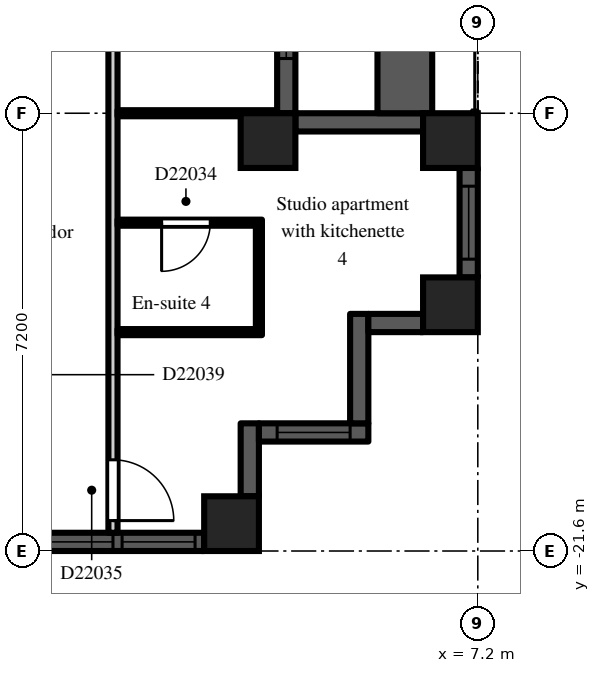
"""IFC4 building model, lengths in metres.
Left out: names, types, materials, properties, quantities, classifications, styles, units other than length and angle.
Written with IfcOpenShell. Run it as: python <this file> out.ifc"""

import sys

from ifc_helpers import new_model, si_unit, direction, frame, frame_2d, origin, origin_2d, place, context, subcontext, project, spatial, rectangle, extrude, element, fill, save


model = new_model("IFC4")
c1 = context("Model", 3, precision=1e-05, world=origin(), true_north=direction((0.0, 1.0)))
c2 = subcontext(c1, "Body", "Model", "MODEL_VIEW")
j1 = project(units=[si_unit("LENGTHUNIT", "METRE"), si_unit("PLANEANGLEUNIT", "RADIAN")], contexts=[c1])
p1 = place(None, origin())
s1 = spatial("IfcSite", under=j1, at=p1, CompositionType="ELEMENT")
p2 = place(p1, origin())
s2 = spatial("IfcBuilding", under=s1, at=p2, CompositionType="ELEMENT")
p3 = place(p2, frame((0.0, 0.0, 156.3)))
s3 = spatial("IfcBuildingStorey", under=s2, at=p3, CompositionType="ELEMENT", Elevation=156.3)
for number, where, z_axis, x_axis in (
    (1, (3.15, -21.15, 0.0), (0.0, 0.0, 1.0), (1.0, 0.0, 0.0)),
    (2, (3.75, -14.85, 0.0), (0.0, 0.0, 1.0), (1.0, 0.0, 0.0)),
    (3, (6.75, -17.55, 0.0), (0.0, 0.0, 1.0), (1.0, 0.0, 0.0)),
    (4, (6.75, -14.85, 0.0), (0.0, 0.0, 1.0), (1.0, 0.0, 0.0)),
):
    element("IfcColumn", number, at=place(p3, frame(where, z_axis=z_axis, x_axis=x_axis)), inside=s3, PredefinedType="COLUMN", context=c2, shape_type="SweptSolid", body=[
        extrude(rectangle(XDim=0.9, YDim=0.9, at=origin_2d()), origin(), (0.0, 0.0, 1.0), 3.0),
    ])
p4 = place(p3, frame((-2.7, -21.45, 0.0), z_axis=(0.0, 0.0, 1.0), x_axis=(1.0, 0.0, 0.0)))
e5 = element("IfcWall", 5, at=p4, inside=s3, PredefinedType="SOLIDWALL", context=c2, shape_type="SweptSolid", body=[
    extrude(rectangle(XDim=5.4, YDim=0.3, at=frame_2d((2.7, 0.0))), origin(), (0.0, 0.0, 1.0), 2.2),
])
p5 = place(p4, frame((1.5, 0.0, 0.2)))
e6 = element("IfcOpeningElement", 6, at=p5, cuts=e5, PredefinedType="OPENING", context=c2, shape_type="SweptSolid", body=[
    extrude(rectangle(XDim=2.4, YDim=1.85, at=frame_2d((1.2, 0.925))), frame((0.0, 0.16, 0.0), z_axis=(0.0, -1.0, 0.0), x_axis=(1.0, 0.0, 0.0)), (0.0, 0.0, 1.0), 0.32),
])
p6 = place(p4, frame((0.15, 0.0, 0.2)))
e7 = element("IfcOpeningElement", 7, at=p6, cuts=e5, PredefinedType="OPENING", context=c2, shape_type="SweptSolid", body=[
    extrude(rectangle(XDim=1.2, YDim=1.85, at=frame_2d((0.6, 0.925))), frame((0.0, 0.16, 0.0), z_axis=(0.0, -1.0, 0.0), x_axis=(1.0, 0.0, 0.0)), (0.0, 0.0, 1.0), 0.32),
])
p7 = place(p4, frame((4.05, 0.0, 0.2)))
e8 = element("IfcOpeningElement", 8, at=p7, cuts=e5, PredefinedType="OPENING", context=c2, shape_type="SweptSolid", body=[
    extrude(rectangle(XDim=1.2, YDim=1.85, at=frame_2d((0.6, 0.925))), frame((0.0, 0.16, 0.0), z_axis=(0.0, -1.0, 0.0), x_axis=(1.0, 0.0, 0.0)), (0.0, 0.0, 1.0), 0.32),
])
p8 = place(p3, frame((3.45, -20.7, 0.0), z_axis=(0.0, 0.0, 1.0), x_axis=(0.0, 1.0, 0.0)))
e9 = element("IfcWall", 9, at=p8, inside=s3, PredefinedType="SOLIDWALL", context=c2, shape_type="SweptSolid", body=[
    extrude(rectangle(XDim=1.2, YDim=0.3, at=frame_2d((0.6, 0.0))), origin(), (0.0, 0.0, 1.0), 2.6),
])
p9 = place(p3, frame((3.6, -19.65, 0.0), z_axis=(0.0, 0.0, 1.0), x_axis=(1.0, 0.0, 0.0)))
e10 = element("IfcWall", 10, at=p9, inside=s3, PredefinedType="SOLIDWALL", context=c2, shape_type="SweptSolid", body=[
    extrude(rectangle(XDim=1.8, YDim=0.3, at=frame_2d((0.9, 0.0))), origin(), (0.0, 0.0, 1.0), 2.6),
])
p10 = place(p9, frame((0.3, 0.0, 0.2)))
e11 = element("IfcOpeningElement", 11, at=p10, cuts=e10, PredefinedType="OPENING", context=c2, shape_type="SweptSolid", body=[
    extrude(rectangle(XDim=1.2, YDim=1.85, at=frame_2d((0.6, 0.925))), frame((0.0, 0.16, 0.0), z_axis=(0.0, -1.0, 0.0), x_axis=(1.0, 0.0, 0.0)), (0.0, 0.0, 1.0), 0.32),
])
p11 = place(p3, frame((5.25, -19.5, 0.0), z_axis=(0.0, 0.0, 1.0), x_axis=(0.0, 1.0, 0.0)))
e12 = element("IfcWall", 12, at=p11, inside=s3, PredefinedType="SOLIDWALL", context=c2, shape_type="SweptSolid", body=[
    extrude(rectangle(XDim=1.8, YDim=0.3, at=frame_2d((0.9, 0.0))), origin(), (0.0, 0.0, 1.0), 2.6),
])
p12 = place(p3, frame((5.4, -17.85, 0.0), z_axis=(0.0, 0.0, 1.0), x_axis=(1.0, 0.0, 0.0)))
e13 = element("IfcWall", 13, at=p12, inside=s3, PredefinedType="SOLIDWALL", context=c2, shape_type="SweptSolid", body=[
    extrude(rectangle(XDim=0.9, YDim=0.3, at=frame_2d((0.45, 0.0))), origin(), (0.0, 0.0, 1.0), 2.6),
])
p13 = place(p3, frame((7.05, -17.1, 0.0), z_axis=(0.0, 0.0, 1.0), x_axis=(0.0, 1.0, 0.0)))
e14 = element("IfcWall", 14, at=p13, inside=s3, PredefinedType="SOLIDWALL", context=c2, shape_type="SweptSolid", body=[
    extrude(rectangle(XDim=1.8, YDim=0.3, at=frame_2d((0.9, 0.0))), origin(), (0.0, 0.0, 1.0), 2.2),
])
p14 = place(p13, frame((0.3, 0.0, 0.2)))
e15 = element("IfcOpeningElement", 15, at=p14, cuts=e14, PredefinedType="OPENING", context=c2, shape_type="SweptSolid", body=[
    extrude(rectangle(XDim=1.2, YDim=1.85, at=frame_2d((0.6, 0.925))), frame((0.0, 0.16, 0.0), z_axis=(0.0, -1.0, 0.0), x_axis=(1.0, 0.0, 0.0)), (0.0, 0.0, 1.0), 0.32),
])
p15 = place(p3, frame((6.3, -14.55, 0.0), z_axis=(0.0, 0.0, 1.0), x_axis=(-1.0, 0.0, 0.0)))
e16 = element("IfcWall", 16, at=p15, inside=s3, PredefinedType="SOLIDWALL", context=c2, shape_type="SweptSolid", body=[
    extrude(rectangle(XDim=2.1, YDim=0.3, at=frame_2d((1.05, 0.0))), origin(), (0.0, 0.0, 1.0), 2.2),
])
p16 = place(p3, frame((4.05, -14.4, 0.0), z_axis=(0.0, 0.0, 1.0), x_axis=(0.0, 1.0, 0.0)))
e17 = element("IfcWall", 17, at=p16, inside=s3, PredefinedType="SOLIDWALL", context=c2, shape_type="SweptSolid", body=[
    extrude(rectangle(XDim=7.2, YDim=0.3, at=frame_2d((3.6, 0.0))), origin(), (0.0, 0.0, 1.0), 2.2),
])
p17 = place(p16, frame((3.0, 0.0, 0.0)))
e18 = element("IfcOpeningElement", 18, at=p17, cuts=e17, PredefinedType="OPENING", context=c2, shape_type="SweptSolid", body=[
    extrude(rectangle(XDim=1.2, YDim=2.05, at=frame_2d((0.6, 1.025))), frame((0.0, 0.16, 0.0), z_axis=(0.0, -1.0, 0.0), x_axis=(1.0, 0.0, 0.0)), (0.0, 0.0, 1.0), 0.32),
])
p18 = place(p16, frame((0.9, 0.0, 0.2)))
e19 = element("IfcOpeningElement", 19, at=p18, cuts=e17, PredefinedType="OPENING", context=c2, shape_type="SweptSolid", body=[
    extrude(rectangle(XDim=1.8, YDim=1.85, at=frame_2d((0.9, 0.925))), frame((0.0, 0.16, 0.0), z_axis=(0.0, -1.0, 0.0), x_axis=(1.0, 0.0, 0.0)), (0.0, 0.0, 1.0), 0.32),
])
p19 = place(p16, frame((4.5, 0.0, 0.2)))
e20 = element("IfcOpeningElement", 20, at=p19, cuts=e17, PredefinedType="OPENING", context=c2, shape_type="SweptSolid", body=[
    extrude(rectangle(XDim=1.8, YDim=1.85, at=frame_2d((0.9, 0.925))), frame((0.0, 0.16, 0.0), z_axis=(0.0, -1.0, 0.0), x_axis=(1.0, 0.0, 0.0)), (0.0, 0.0, 1.0), 0.32),
])
p20 = place(p3, frame((6.0, -14.4, 0.0), z_axis=(0.0, 0.0, 1.0), x_axis=(0.0, 1.0, 0.0)))
e21 = element("IfcWall", 21, at=p20, inside=s3, PredefinedType="PARAPET", context=c2, shape_type="SweptSolid", body=[
    extrude(rectangle(XDim=7.2, YDim=0.9, at=frame_2d((3.6, 0.0))), origin(), (0.0, 0.0, 1.0), 0.8),
])
p21 = place(p3, frame((1.2, -21.3, 0.0), z_axis=(0.0, 0.0, 1.0), x_axis=(0.0, 1.0, 0.0)))
e22 = element("IfcWall", 22, at=p21, inside=s3, PredefinedType="PARTITIONING", context=c2, shape_type="SweptSolid", body=[
    extrude(rectangle(XDim=14.175, YDim=0.15, at=frame_2d((7.087, 0.0))), origin(), (0.0, 0.0, 1.0), 2.6),
])
p22 = place(p21, frame((8.25, 0.0, 0.0)))
e23 = element("IfcOpeningElement", 23, at=p22, cuts=e22, PredefinedType="OPENING", context=c2, shape_type="SweptSolid", body=[
    extrude(rectangle(XDim=0.9, YDim=2.1, at=frame_2d((0.45, 1.05))), frame((0.0, 0.085, 0.0), z_axis=(0.0, -1.0, 0.0), x_axis=(1.0, 0.0, 0.0)), (0.0, 0.0, 1.0), 0.17),
])
p23 = place(p21, frame((0.2, 0.0, 0.0)))
e24 = element("IfcOpeningElement", 24, at=p23, cuts=e22, PredefinedType="OPENING", context=c2, shape_type="SweptSolid", body=[
    extrude(rectangle(XDim=1.0, YDim=2.1, at=frame_2d((0.5, 1.05))), frame((0.0, 0.085, 0.0), z_axis=(0.0, -1.0, 0.0), x_axis=(1.0, 0.0, 0.0)), (0.0, 0.0, 1.0), 0.17),
])
p24 = place(p3, frame((1.275, -18.0, 0.0), z_axis=(0.0, 0.0, 1.0), x_axis=(1.0, 0.0, 0.0)))
e25 = element("IfcWall", 25, at=p24, inside=s3, PredefinedType="PARTITIONING", context=c2, shape_type="SweptSolid", body=[
    extrude(rectangle(XDim=2.375, YDim=0.1, at=frame_2d((1.188, 0.0))), origin(), (0.0, 0.0, 1.0), 2.6),
])
p25 = place(p3, frame((1.275, -16.2, 0.0), z_axis=(0.0, 0.0, 1.0), x_axis=(1.0, 0.0, 0.0)))
e26 = element("IfcWall", 26, at=p25, inside=s3, PredefinedType="PARTITIONING", context=c2, shape_type="SweptSolid", body=[
    extrude(rectangle(XDim=2.375, YDim=0.1, at=frame_2d((1.188, 0.0))), origin(), (0.0, 0.0, 1.0), 2.6),
])
p26 = place(p25, frame((0.725, 0.0, 0.0)))
e27 = element("IfcOpeningElement", 27, at=p26, cuts=e26, PredefinedType="OPENING", context=c2, shape_type="SweptSolid", body=[
    extrude(rectangle(XDim=0.8, YDim=2.1, at=frame_2d((0.4, 1.05))), frame((0.0, 0.06, 0.0), z_axis=(0.0, -1.0, 0.0), x_axis=(1.0, 0.0, 0.0)), (0.0, 0.0, 1.0), 0.12),
])
p27 = place(p3, frame((1.275, -14.4, 0.0), z_axis=(0.0, 0.0, 1.0), x_axis=(1.0, 0.0, 0.0)))
e28 = element("IfcWall", 28, at=p27, inside=s3, PredefinedType="PARTITIONING", context=c2, shape_type="SweptSolid", body=[
    extrude(rectangle(XDim=2.625, YDim=0.1, at=frame_2d((1.312, 0.0))), origin(), (0.0, 0.0, 1.0), 2.6),
])
p28 = place(p3, frame((3.6, -17.95, 0.0), z_axis=(0.0, 0.0, 1.0), x_axis=(0.0, 1.0, 0.0)))
e29 = element("IfcWall", 29, at=p28, inside=s3, PredefinedType="PARTITIONING", context=c2, shape_type="SweptSolid", body=[
    extrude(rectangle(XDim=1.7, YDim=0.1, at=frame_2d((0.85, 0.0))), origin(), (0.0, 0.0, 1.0), 2.6),
])
p29 = place(p5, origin())
e30 = element("IfcWindow", 30, at=p29, inside=s3, PartitioningType="SINGLE_PANEL", PredefinedType="WINDOW", context=c2, shape_type="SweptSolid", body=[
    extrude(rectangle(XDim=2.4, YDim=1.85, at=frame_2d((1.2, 0.925))), frame((0.0, 0.03, 0.0), z_axis=(0.0, -1.0, 0.0), x_axis=(1.0, 0.0, 0.0)), (0.0, 0.0, 1.0), 0.06),
])
fill(e6, e30)
p30 = place(p7, origin())
e31 = element("IfcWindow", 31, at=p30, inside=s3, PartitioningType="SINGLE_PANEL", PredefinedType="WINDOW", context=c2, shape_type="SweptSolid", body=[
    extrude(rectangle(XDim=1.2, YDim=1.85, at=frame_2d((0.6, 0.925))), frame((0.0, 0.03, 0.0), z_axis=(0.0, -1.0, 0.0), x_axis=(1.0, 0.0, 0.0)), (0.0, 0.0, 1.0), 0.06),
])
fill(e8, e31)
p31 = place(p10, origin())
e32 = element("IfcWindow", 32, at=p31, inside=s3, PartitioningType="SINGLE_PANEL", PredefinedType="WINDOW", context=c2, shape_type="SweptSolid", body=[
    extrude(rectangle(XDim=1.2, YDim=1.85, at=frame_2d((0.6, 0.925))), frame((0.0, 0.03, 0.0), z_axis=(0.0, -1.0, 0.0), x_axis=(1.0, 0.0, 0.0)), (0.0, 0.0, 1.0), 0.06),
])
fill(e11, e32)
p32 = place(p14, origin())
e33 = element("IfcWindow", 33, at=p32, inside=s3, PartitioningType="SINGLE_PANEL", PredefinedType="WINDOW", context=c2, shape_type="SweptSolid", body=[
    extrude(rectangle(XDim=1.2, YDim=1.85, at=frame_2d((0.6, 0.925))), frame((0.0, 0.03, 0.0), z_axis=(0.0, -1.0, 0.0), x_axis=(1.0, 0.0, 0.0)), (0.0, 0.0, 1.0), 0.06),
])
fill(e15, e33)
p33 = place(p18, origin())
e34 = element("IfcWindow", 34, at=p33, inside=s3, PartitioningType="SINGLE_PANEL", PredefinedType="WINDOW", context=c2, shape_type="SweptSolid", body=[
    extrude(rectangle(XDim=1.8, YDim=1.85, at=frame_2d((0.9, 0.925))), frame((0.0, 0.03, 0.0), z_axis=(0.0, -1.0, 0.0), x_axis=(1.0, 0.0, 0.0)), (0.0, 0.0, 1.0), 0.06),
])
fill(e19, e34)
p34 = place(p26, frame((0.8, 0.0, 0.0), z_axis=(0.0, 0.0, 1.0), x_axis=(-1.0, 0.0, 0.0)))
e35 = element("IfcDoor", 35, at=p34, inside=s3, OperationType="SINGLE_SWING_RIGHT", PredefinedType="DOOR", context=c2, shape_type="SweptSolid", body=[
    extrude(rectangle(XDim=0.8, YDim=2.1, at=frame_2d((0.4, 1.05))), frame((0.0, 0.025, 0.0), z_axis=(0.0, -1.0, 0.0), x_axis=(1.0, 0.0, 0.0)), (0.0, 0.0, 1.0), 0.05),
])
fill(e27, e35)
p35 = place(p23, frame((1.0, 0.0, 0.0), z_axis=(0.0, 0.0, 1.0), x_axis=(-1.0, 0.0, 0.0)))
e36 = element("IfcDoor", 36, at=p35, inside=s3, OperationType="SINGLE_SWING_RIGHT", PredefinedType="DOOR", context=c2, shape_type="SweptSolid", body=[
    extrude(rectangle(XDim=1.0, YDim=2.1, at=frame_2d((0.5, 1.05))), frame((0.0, 0.025, 0.0), z_axis=(0.0, -1.0, 0.0), x_axis=(1.0, 0.0, 0.0)), (0.0, 0.0, 1.0), 0.05),
])
fill(e24, e36)
save(model, sys.argv[1])
